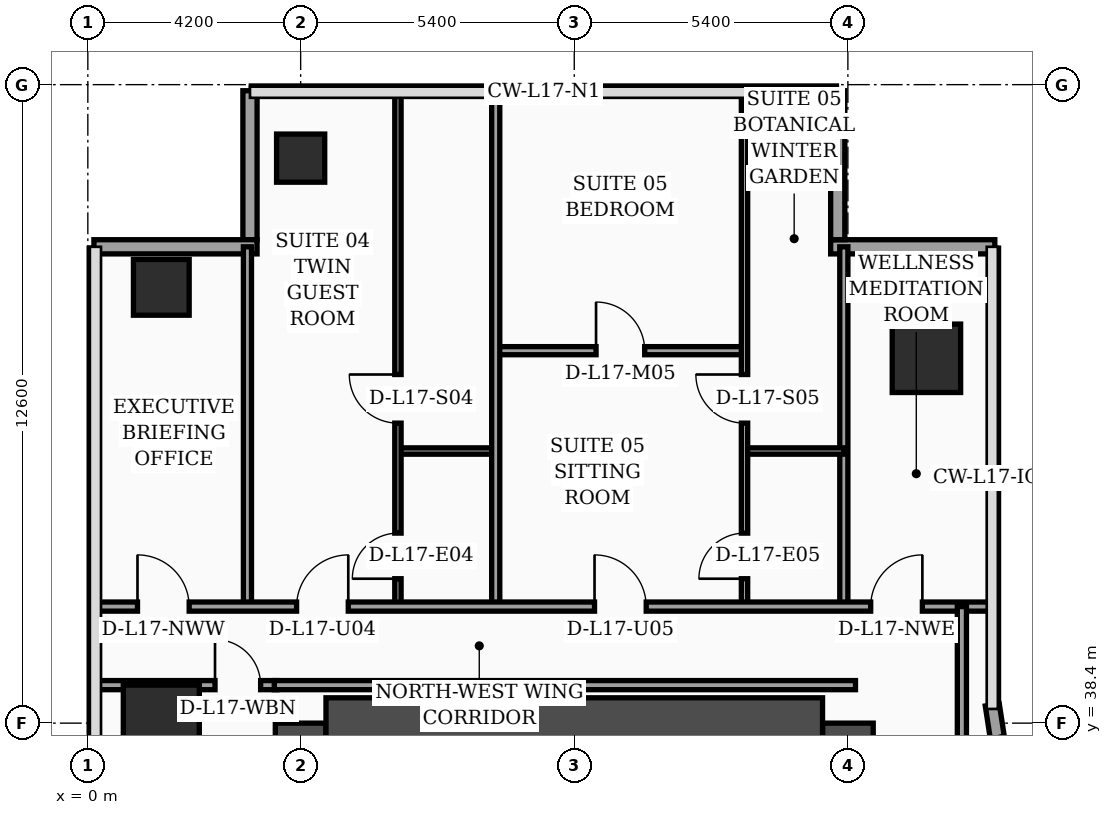
"""IFC4 building model, lengths in metres.
Left out: names, types, materials, properties, quantities, classifications, styles, units other than length and angle.
Written with IfcOpenShell. Run it as: python <this file> out.ifc"""

import sys

from ifc_helpers import new_model, si_unit, direction, frame, frame_2d, origin, origin_2d, place, context, subcontext, project, spatial, rectangle, hollow_rectangle, extrude, element, fill, save


model = new_model("IFC4")
c1 = context("Model", 3, precision=1e-05, world=origin(), true_north=direction((0.0, 1.0)))
c2 = subcontext(c1, "Body", "Model", "MODEL_VIEW")
j1 = project(units=[si_unit("LENGTHUNIT", "METRE"), si_unit("PLANEANGLEUNIT", "RADIAN")], contexts=[c1])
p1 = place(None, origin())
s1 = spatial("IfcSite", under=j1, at=p1, CompositionType="ELEMENT")
p2 = place(p1, origin())
s2 = spatial("IfcBuilding", under=s1, at=p2, CompositionType="ELEMENT")
p3 = place(p2, frame((0.0, 0.0, 73.6)))
s3 = spatial("IfcBuildingStorey", under=s2, at=p3, CompositionType="ELEMENT", Elevation=73.6)
p4 = place(p3, frame((4.2, 16.8, 0.0), z_axis=(0.0, 0.0, 1.0), x_axis=(0.0, 1.0, 0.0)))
e1 = element("IfcWall", 1, at=p4, inside=s3, PredefinedType="SHEAR", context=c2, shape_type="SweptSolid", body=[
    extrude(rectangle(XDim=21.6, YDim=1.0, at=frame_2d((10.8, 0.0))), origin(), (0.0, 0.0, 1.0), 3.56),
])
p5 = place(p3, frame((15.0, 16.8, 0.0), z_axis=(0.0, 0.0, 1.0), x_axis=(0.0, 1.0, 0.0)))
e2 = element("IfcWall", 2, at=p5, inside=s3, PredefinedType="SHEAR", context=c2, shape_type="SweptSolid", body=[
    extrude(rectangle(XDim=21.6, YDim=1.0, at=frame_2d((10.8, 0.0))), origin(), (0.0, 0.0, 1.0), 3.56),
])
p6 = place(p5, frame((8.65, 0.0, 0.0)))
e3 = element("IfcOpeningElement", 3, at=p6, cuts=e2, PredefinedType="OPENING", context=c2, shape_type="SweptSolid", body=[
    extrude(rectangle(XDim=1.1, YDim=2.2, at=frame_2d((0.55, 1.1))), frame((0.0, 0.51, 0.0), z_axis=(0.0, -1.0, 0.0), x_axis=(1.0, 0.0, 0.0)), (0.0, 0.0, 1.0), 1.02),
])
p7 = place(p5, frame((1.25, 0.0, 0.0)))
e4 = element("IfcOpeningElement", 4, at=p7, cuts=e2, PredefinedType="OPENING", context=c2, shape_type="SweptSolid", body=[
    extrude(rectangle(XDim=1.1, YDim=2.2, at=frame_2d((0.55, 1.1))), frame((0.0, 0.51, 0.0), z_axis=(0.0, -1.0, 0.0), x_axis=(1.0, 0.0, 0.0)), (0.0, 0.0, 1.0), 1.02),
])
p8 = place(p5, frame((3.8, 0.0, 0.0)))
e5 = element("IfcOpeningElement", 5, at=p8, cuts=e2, PredefinedType="OPENING", context=c2, shape_type="SweptSolid", body=[
    extrude(rectangle(XDim=1.1, YDim=2.2, at=frame_2d((0.55, 1.1))), frame((0.0, 0.51, 0.0), z_axis=(0.0, -1.0, 0.0), x_axis=(1.0, 0.0, 0.0)), (0.0, 0.0, 1.0), 1.02),
])
p9 = place(p5, frame((6.35, 0.0, 0.0)))
e6 = element("IfcOpeningElement", 6, at=p9, cuts=e2, PredefinedType="OPENING", context=c2, shape_type="SweptSolid", body=[
    extrude(rectangle(XDim=1.1, YDim=2.2, at=frame_2d((0.55, 1.1))), frame((0.0, 0.51, 0.0), z_axis=(0.0, -1.0, 0.0), x_axis=(1.0, 0.0, 0.0)), (0.0, 0.0, 1.0), 1.02),
])
p10 = place(p3, frame((4.7, 38.4, 0.0), z_axis=(0.0, 0.0, 1.0), x_axis=(1.0, 0.0, 0.0)))
e7 = element("IfcWall", 7, at=p10, inside=s3, PredefinedType="SHEAR", context=c2, shape_type="SweptSolid", body=[
    extrude(rectangle(XDim=9.8, YDim=1.0, at=frame_2d((4.9, 0.0))), origin(), (0.0, 0.0, 1.0), 3.56),
])
p11 = place(p3, frame((1.45, 38.4, 0.0), z_axis=(0.0, 0.0, 1.0), x_axis=(1.0, 0.0, 0.0)))
e8 = element("IfcColumn", 8, at=p11, inside=s3, PredefinedType="COLUMN", context=c2, shape_type="SweptSolid", body=[
    extrude(rectangle(XDim=1.5, YDim=1.5, at=origin_2d()), origin(), (0.0, 0.0, 1.0), 3.56),
])
p12 = place(p3, frame((1.45, 47.0, 0.0), z_axis=(0.0, 0.0, 1.0), x_axis=(1.0, 0.0, 0.0)))
e9 = element("IfcColumn", 9, at=p12, inside=s3, PredefinedType="COLUMN", context=c2, shape_type="SweptSolid", body=[
    extrude(hollow_rectangle(XDim=1.1, YDim=1.1, WallThickness=0.045, at=origin_2d()), origin(), (0.0, 0.0, 1.0), 3.56),
])
p13 = place(p3, frame((4.2, 49.55, 0.0), z_axis=(0.0, 0.0, 1.0), x_axis=(1.0, 0.0, 0.0)))
e10 = element("IfcColumn", 10, at=p13, inside=s3, PredefinedType="COLUMN", context=c2, shape_type="SweptSolid", body=[
    extrude(hollow_rectangle(XDim=0.95, YDim=0.95, WallThickness=0.04, at=origin_2d()), origin(), (0.0, 0.0, 1.0), 3.56),
])
p14 = place(p3, frame((16.55, 45.6, 0.0), z_axis=(0.0, 0.0, 1.0), x_axis=(1.0, 0.0, 0.0)))
e11 = element("IfcColumn", 11, at=p14, inside=s3, PredefinedType="COLUMN", context=c2, shape_type="SweptSolid", body=[
    extrude(rectangle(XDim=1.35, YDim=1.35, at=origin_2d()), origin(), (0.0, 0.0, 1.0), 3.56),
])
p15 = place(p3, frame((17.962, 38.03, 0.0), z_axis=(0.0, 0.0, 1.0), x_axis=(-0.15141125477, 0.988470855377, 0.0)))
e12 = element("IfcWall", 12, at=p15, inside=s3, PredefinedType="SOLIDWALL", context=c2, shape_type="SweptSolid", body=[
    extrude(rectangle(XDim=0.739, YDim=0.28, at=frame_2d((0.369, 0.0))), origin(), (0.0, 0.0, 1.0), 3.56),
])
p16 = place(p3, frame((17.9, 47.8, 0.0), z_axis=(0.0, 0.0, 1.0), x_axis=(-1.0, 0.0, 0.0)))
e13 = element("IfcWall", 13, at=p16, inside=s3, PredefinedType="SOLIDWALL", context=c2, shape_type="SweptSolid", body=[
    extrude(rectangle(XDim=3.24, YDim=0.28, at=frame_2d((1.62, 0.0))), origin(), (0.0, 0.0, 1.0), 3.56),
])
p17 = place(p3, frame((14.8, 47.94, 0.0), z_axis=(0.0, 0.0, 1.0), x_axis=(0.0, 1.0, 0.0)))
e14 = element("IfcWall", 14, at=p17, inside=s3, PredefinedType="SOLIDWALL", context=c2, shape_type="SweptSolid", body=[
    extrude(rectangle(XDim=2.94, YDim=0.28, at=frame_2d((1.47, 0.0))), origin(), (0.0, 0.0, 1.0), 3.56),
])
p18 = place(p3, frame((3.2, 50.88, 0.0), z_axis=(0.0, 0.0, 1.0), x_axis=(0.0, -1.0, 0.0)))
e15 = element("IfcWall", 15, at=p18, inside=s3, PredefinedType="SOLIDWALL", context=c2, shape_type="SweptSolid", body=[
    extrude(rectangle(XDim=2.94, YDim=0.28, at=frame_2d((1.47, 0.0))), origin(), (0.0, 0.0, 1.0), 3.04),
])
p19 = place(p3, frame((3.34, 47.8, 0.0), z_axis=(0.0, 0.0, 1.0), x_axis=(-1.0, 0.0, 0.0)))
e16 = element("IfcWall", 16, at=p19, inside=s3, PredefinedType="SOLIDWALL", context=c2, shape_type="SweptSolid", body=[
    extrude(rectangle(XDim=3.22, YDim=0.28, at=frame_2d((1.61, 0.0))), origin(), (0.0, 0.0, 1.0), 3.04),
])
p20 = place(p3, frame((0.08, 39.15, 0.0), z_axis=(0.0, 0.0, 1.0), x_axis=(1.0, 0.0, 0.0)))
e17 = element("IfcWall", 17, at=p20, inside=s3, PredefinedType="PARTITIONING", context=c2, shape_type="SweptSolid", body=[
    extrude(rectangle(XDim=3.65, YDim=0.18, at=frame_2d((1.825, 0.0))), origin(), (0.0, 0.0, 1.0), 2.84),
])
p21 = place(p20, frame((2.43, 0.0, 0.0)))
e18 = element("IfcOpeningElement", 18, at=p21, cuts=e17, PredefinedType="OPENING", context=c2, shape_type="SweptSolid", body=[
    extrude(rectangle(XDim=0.9, YDim=2.15, at=frame_2d((0.45, 1.075))), frame((0.0, 0.1, 0.0), z_axis=(0.0, -1.0, 0.0), x_axis=(1.0, 0.0, 0.0)), (0.0, 0.0, 1.0), 0.2),
])
p22 = place(p3, frame((3.15, 40.7, 0.0), z_axis=(0.0, 0.0, 1.0), x_axis=(0.0, 1.0, 0.0)))
e19 = element("IfcWall", 19, at=p22, inside=s3, PredefinedType="PARTITIONING", context=c2, shape_type="SweptSolid", body=[
    extrude(rectangle(XDim=7.1, YDim=0.16, at=frame_2d((3.55, 0.0))), origin(), (0.0, 0.0, 1.0), 3.14),
])
p23 = place(p3, frame((14.92, 40.7, 0.0), z_axis=(0.0, 0.0, 1.0), x_axis=(0.0, 1.0, 0.0)))
e20 = element("IfcWall", 20, at=p23, inside=s3, PredefinedType="PARTITIONING", context=c2, shape_type="SweptSolid", body=[
    extrude(rectangle(XDim=7.1, YDim=0.16, at=frame_2d((3.55, 0.0))), origin(), (0.0, 0.0, 1.0), 3.04),
])
p24 = place(p3, frame((6.12, 43.77, 0.0), z_axis=(0.0, 0.0, 1.0), x_axis=(1.0, 0.0, 0.0)))
e21 = element("IfcWall", 21, at=p24, inside=s3, PredefinedType="PARTITIONING", context=c2, shape_type="SweptSolid", body=[
    extrude(rectangle(XDim=1.93, YDim=0.125, at=frame_2d((0.965, 0.0))), origin(), (0.0, 0.0, 1.0), 3.56),
])
p25 = place(p3, frame((6.12, 40.7, 0.0), z_axis=(0.0, 0.0, 1.0), x_axis=(0.0, 1.0, 0.0)))
e22 = element("IfcWall", 22, at=p25, inside=s3, PredefinedType="PARTITIONING", context=c2, shape_type="SweptSolid", body=[
    extrude(rectangle(XDim=10.24, YDim=0.125, at=frame_2d((5.12, 0.0))), origin(), (0.0, 0.0, 1.0), 3.04),
])
p26 = place(p25, frame((0.55, 0.0, 0.0)))
e23 = element("IfcOpeningElement", 23, at=p26, cuts=e22, PredefinedType="OPENING", context=c2, shape_type="SweptSolid", body=[
    extrude(rectangle(XDim=0.9, YDim=2.15, at=frame_2d((0.45, 1.075))), frame((0.0, 0.073, 0.0), z_axis=(0.0, -1.0, 0.0), x_axis=(1.0, 0.0, 0.0)), (0.0, 0.0, 1.0), 0.145),
])
p27 = place(p25, frame((3.62, 0.0, 0.0)))
e24 = element("IfcOpeningElement", 24, at=p27, cuts=e22, PredefinedType="OPENING", context=c2, shape_type="SweptSolid", body=[
    extrude(rectangle(XDim=0.96, YDim=2.2, at=frame_2d((0.48, 1.1))), frame((0.0, 0.073, 0.0), z_axis=(0.0, -1.0, 0.0), x_axis=(1.0, 0.0, 0.0)), (0.0, 0.0, 1.0), 0.145),
])
p28 = place(p3, frame((12.96, 43.77, 0.0), z_axis=(0.0, 0.0, 1.0), x_axis=(1.0, 0.0, 0.0)))
e25 = element("IfcWall", 25, at=p28, inside=s3, PredefinedType="PARTITIONING", context=c2, shape_type="SweptSolid", body=[
    extrude(rectangle(XDim=1.96, YDim=0.125, at=frame_2d((0.98, 0.0))), origin(), (0.0, 0.0, 1.0), 3.56),
])
p29 = place(p3, frame((8.05, 45.75, 0.0), z_axis=(0.0, 0.0, 1.0), x_axis=(1.0, 0.0, 0.0)))
e26 = element("IfcWall", 26, at=p29, inside=s3, PredefinedType="PARTITIONING", context=c2, shape_type="SweptSolid", body=[
    extrude(rectangle(XDim=4.91, YDim=0.16, at=frame_2d((2.455, 0.0))), origin(), (0.0, 0.0, 1.0), 3.56),
])
p30 = place(p29, frame((1.98, 0.0, 0.0)))
e27 = element("IfcOpeningElement", 27, at=p30, cuts=e26, PredefinedType="OPENING", context=c2, shape_type="SweptSolid", body=[
    extrude(rectangle(XDim=0.96, YDim=2.2, at=frame_2d((0.48, 1.1))), frame((0.0, 0.09, 0.0), z_axis=(0.0, -1.0, 0.0), x_axis=(1.0, 0.0, 0.0)), (0.0, 0.0, 1.0), 0.18),
])
p31 = place(p3, frame((12.96, 40.7, 0.0), z_axis=(0.0, 0.0, 1.0), x_axis=(0.0, 1.0, 0.0)))
e28 = element("IfcWall", 28, at=p31, inside=s3, PredefinedType="PARTITIONING", context=c2, shape_type="SweptSolid", body=[
    extrude(rectangle(XDim=10.24, YDim=0.125, at=frame_2d((5.12, 0.0))), origin(), (0.0, 0.0, 1.0), 3.04),
])
p32 = place(p31, frame((0.55, 0.0, 0.0)))
e29 = element("IfcOpeningElement", 29, at=p32, cuts=e28, PredefinedType="OPENING", context=c2, shape_type="SweptSolid", body=[
    extrude(rectangle(XDim=0.9, YDim=2.15, at=frame_2d((0.45, 1.075))), frame((0.0, 0.073, 0.0), z_axis=(0.0, -1.0, 0.0), x_axis=(1.0, 0.0, 0.0)), (0.0, 0.0, 1.0), 0.145),
])
p33 = place(p31, frame((3.62, 0.0, 0.0)))
e30 = element("IfcOpeningElement", 30, at=p33, cuts=e28, PredefinedType="OPENING", context=c2, shape_type="SweptSolid", body=[
    extrude(rectangle(XDim=0.96, YDim=2.2, at=frame_2d((0.48, 1.1))), frame((0.0, 0.073, 0.0), z_axis=(0.0, -1.0, 0.0), x_axis=(1.0, 0.0, 0.0)), (0.0, 0.0, 1.0), 0.145),
])
p34 = place(p3, frame((8.05, 40.7, 0.0), z_axis=(0.0, 0.0, 1.0), x_axis=(0.0, 1.0, 0.0)))
e31 = element("IfcWall", 31, at=p34, inside=s3, PredefinedType="PARTITIONING", context=c2, shape_type="SweptSolid", body=[
    extrude(rectangle(XDim=10.24, YDim=0.16, at=frame_2d((5.12, 0.0))), origin(), (0.0, 0.0, 1.0), 3.04),
])
p35 = place(p3, frame((0.08, 40.7, 0.0), z_axis=(0.0, 0.0, 1.0), x_axis=(1.0, 0.0, 0.0)))
e32 = element("IfcWall", 32, at=p35, inside=s3, PredefinedType="PARTITIONING", context=c2, shape_type="SweptSolid", body=[
    extrude(rectangle(XDim=17.77, YDim=0.18, at=frame_2d((8.885, 0.0))), origin(), (0.0, 0.0, 1.0), 2.84),
])
p36 = place(p35, frame((0.9, 0.0, 0.0)))
e33 = element("IfcOpeningElement", 33, at=p36, cuts=e32, PredefinedType="OPENING", context=c2, shape_type="SweptSolid", body=[
    extrude(rectangle(XDim=1.02, YDim=2.2, at=frame_2d((0.51, 1.1))), frame((0.0, 0.1, 0.0), z_axis=(0.0, -1.0, 0.0), x_axis=(1.0, 0.0, 0.0)), (0.0, 0.0, 1.0), 0.2),
])
p37 = place(p35, frame((4.04, 0.0, 0.0)))
e34 = element("IfcOpeningElement", 34, at=p37, cuts=e32, PredefinedType="OPENING", context=c2, shape_type="SweptSolid", body=[
    extrude(rectangle(XDim=1.02, YDim=2.2, at=frame_2d((0.51, 1.1))), frame((0.0, 0.1, 0.0), z_axis=(0.0, -1.0, 0.0), x_axis=(1.0, 0.0, 0.0)), (0.0, 0.0, 1.0), 0.2),
])
p38 = place(p35, frame((9.92, 0.0, 0.0)))
e35 = element("IfcOpeningElement", 35, at=p38, cuts=e32, PredefinedType="OPENING", context=c2, shape_type="SweptSolid", body=[
    extrude(rectangle(XDim=1.02, YDim=2.2, at=frame_2d((0.51, 1.1))), frame((0.0, 0.1, 0.0), z_axis=(0.0, -1.0, 0.0), x_axis=(1.0, 0.0, 0.0)), (0.0, 0.0, 1.0), 0.2),
])
p39 = place(p35, frame((15.37, 0.0, 0.0)))
e36 = element("IfcOpeningElement", 36, at=p39, cuts=e32, PredefinedType="OPENING", context=c2, shape_type="SweptSolid", body=[
    extrude(rectangle(XDim=1.02, YDim=2.2, at=frame_2d((0.51, 1.1))), frame((0.0, 0.1, 0.0), z_axis=(0.0, -1.0, 0.0), x_axis=(1.0, 0.0, 0.0)), (0.0, 0.0, 1.0), 0.2),
])
p40 = place(p3, frame((17.25, 24.3, 0.0), z_axis=(0.0, 0.0, 1.0), x_axis=(0.0, 1.0, 0.0)))
e37 = element("IfcWall", 37, at=p40, inside=s3, PredefinedType="PARTITIONING", context=c2, shape_type="SweptSolid", body=[
    extrude(rectangle(XDim=16.4, YDim=0.18, at=frame_2d((8.2, 0.0))), origin(), (0.0, 0.0, 1.0), 2.84),
])
p41 = place(p3, frame((3.68, 39.15, 0.0), z_axis=(0.0, 0.0, 1.0), x_axis=(1.0, 0.0, 0.0)))
e38 = element("IfcWall", 38, at=p41, inside=s3, PredefinedType="PARTITIONING", context=c2, shape_type="SweptSolid", body=[
    extrude(rectangle(XDim=11.47, YDim=0.18, at=frame_2d((5.735, 0.0))), origin(), (0.0, 0.0, 1.0), 2.84),
])
p42 = place(p21, origin())
e39 = element("IfcDoor", 39, at=p42, inside=s3, OperationType="SINGLE_SWING_LEFT", PredefinedType="DOOR", context=c2, shape_type="SweptSolid", body=[
    extrude(rectangle(XDim=0.9, YDim=2.15, at=frame_2d((0.45, 1.075))), frame((0.0, 0.025, 0.0), z_axis=(0.0, -1.0, 0.0), x_axis=(1.0, 0.0, 0.0)), (0.0, 0.0, 1.0), 0.05),
])
fill(e18, e39)
p43 = place(p26, origin())
e40 = element("IfcDoor", 40, at=p43, inside=s3, OperationType="SINGLE_SWING_LEFT", PredefinedType="DOOR", context=c2, shape_type="SweptSolid", body=[
    extrude(rectangle(XDim=0.9, YDim=2.15, at=frame_2d((0.45, 1.075))), frame((0.0, 0.025, 0.0), z_axis=(0.0, -1.0, 0.0), x_axis=(1.0, 0.0, 0.0)), (0.0, 0.0, 1.0), 0.05),
])
fill(e23, e40)
p44 = place(p27, origin())
e41 = element("IfcDoor", 41, at=p44, inside=s3, OperationType="SINGLE_SWING_RIGHT", PredefinedType="DOOR", context=c2, shape_type="SweptSolid", body=[
    extrude(rectangle(XDim=0.96, YDim=2.2, at=frame_2d((0.48, 1.1))), frame((0.0, 0.025, 0.0), z_axis=(0.0, -1.0, 0.0), x_axis=(1.0, 0.0, 0.0)), (0.0, 0.0, 1.0), 0.05),
])
fill(e24, e41)
p45 = place(p30, origin())
e42 = element("IfcDoor", 42, at=p45, inside=s3, OperationType="SINGLE_SWING_LEFT", PredefinedType="DOOR", context=c2, shape_type="SweptSolid", body=[
    extrude(rectangle(XDim=0.96, YDim=2.2, at=frame_2d((0.48, 1.1))), frame((0.0, 0.025, 0.0), z_axis=(0.0, -1.0, 0.0), x_axis=(1.0, 0.0, 0.0)), (0.0, 0.0, 1.0), 0.05),
])
fill(e27, e42)
p46 = place(p32, origin())
e43 = element("IfcDoor", 43, at=p46, inside=s3, OperationType="SINGLE_SWING_LEFT", PredefinedType="DOOR", context=c2, shape_type="SweptSolid", body=[
    extrude(rectangle(XDim=0.9, YDim=2.15, at=frame_2d((0.45, 1.075))), frame((0.0, 0.025, 0.0), z_axis=(0.0, -1.0, 0.0), x_axis=(1.0, 0.0, 0.0)), (0.0, 0.0, 1.0), 0.05),
])
fill(e29, e43)
p47 = place(p33, origin())
e44 = element("IfcDoor", 44, at=p47, inside=s3, OperationType="SINGLE_SWING_RIGHT", PredefinedType="DOOR", context=c2, shape_type="SweptSolid", body=[
    extrude(rectangle(XDim=0.96, YDim=2.2, at=frame_2d((0.48, 1.1))), frame((0.0, 0.025, 0.0), z_axis=(0.0, -1.0, 0.0), x_axis=(1.0, 0.0, 0.0)), (0.0, 0.0, 1.0), 0.05),
])
fill(e30, e44)
p48 = place(p36, origin())
e45 = element("IfcDoor", 45, at=p48, inside=s3, OperationType="SINGLE_SWING_LEFT", PredefinedType="DOOR", context=c2, shape_type="SweptSolid", body=[
    extrude(rectangle(XDim=1.02, YDim=2.2, at=frame_2d((0.51, 1.1))), frame((0.0, 0.025, 0.0), z_axis=(0.0, -1.0, 0.0), x_axis=(1.0, 0.0, 0.0)), (0.0, 0.0, 1.0), 0.05),
])
fill(e33, e45)
p49 = place(p37, origin())
e46 = element("IfcDoor", 46, at=p49, inside=s3, OperationType="SINGLE_SWING_RIGHT", PredefinedType="DOOR", context=c2, shape_type="SweptSolid", body=[
    extrude(rectangle(XDim=1.02, YDim=2.2, at=frame_2d((0.51, 1.1))), frame((0.0, 0.025, 0.0), z_axis=(0.0, -1.0, 0.0), x_axis=(1.0, 0.0, 0.0)), (0.0, 0.0, 1.0), 0.05),
])
fill(e34, e46)
p50 = place(p38, origin())
e47 = element("IfcDoor", 47, at=p50, inside=s3, OperationType="SINGLE_SWING_LEFT", PredefinedType="DOOR", context=c2, shape_type="SweptSolid", body=[
    extrude(rectangle(XDim=1.02, YDim=2.2, at=frame_2d((0.51, 1.1))), frame((0.0, 0.025, 0.0), z_axis=(0.0, -1.0, 0.0), x_axis=(1.0, 0.0, 0.0)), (0.0, 0.0, 1.0), 0.05),
])
fill(e35, e47)
p51 = place(p39, origin())
e48 = element("IfcDoor", 48, at=p51, inside=s3, OperationType="SINGLE_SWING_RIGHT", PredefinedType="DOOR", context=c2, shape_type="SweptSolid", body=[
    extrude(rectangle(XDim=1.02, YDim=2.2, at=frame_2d((0.51, 1.1))), frame((0.0, 0.025, 0.0), z_axis=(0.0, -1.0, 0.0), x_axis=(1.0, 0.0, 0.0)), (0.0, 0.0, 1.0), 0.05),
])
fill(e36, e48)
save(model, sys.argv[1])
